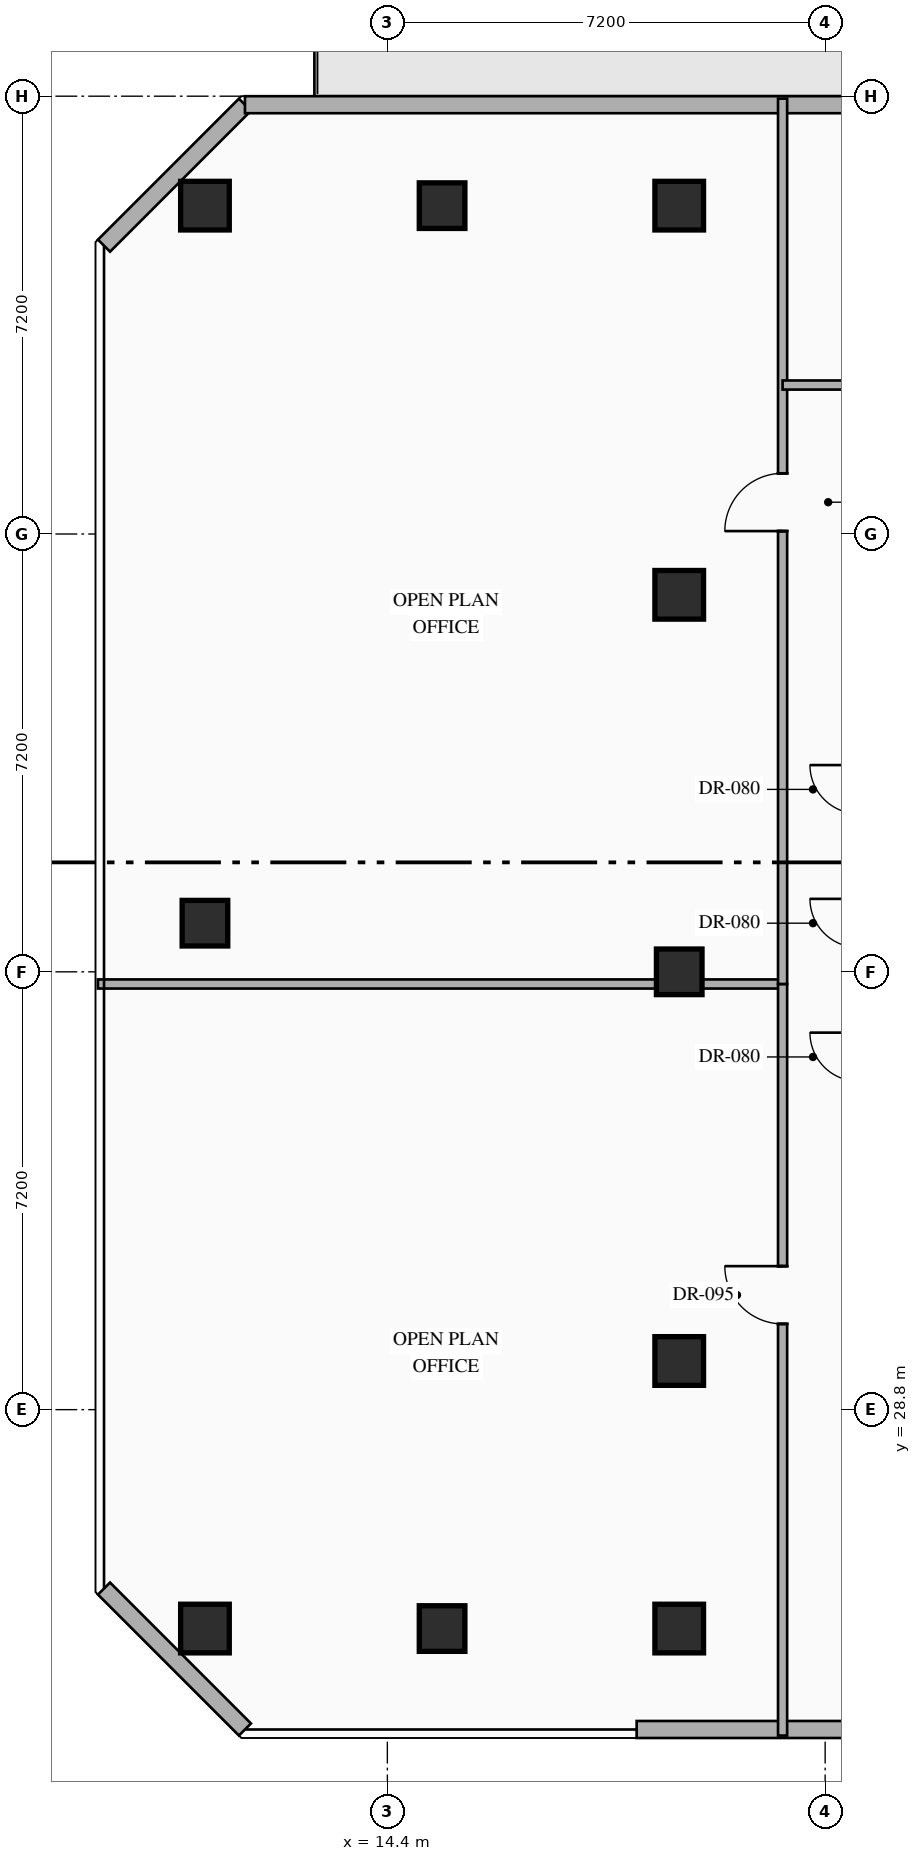
"""IFC4 building model, lengths in metres.
Left out: names, types, materials, properties, quantities, classifications, styles, units other than length and angle.
Written with IfcOpenShell. Run it as: python <this file> out.ifc"""

import sys

from ifc_helpers import new_model, si_unit, direction, frame, frame_2d, origin, origin_2d, place, context, subcontext, project, spatial, rectangle, hollow_rectangle, extrude, element, fill, save


model = new_model("IFC4")
c1 = context("Model", 3, precision=1e-05, world=origin(), true_north=direction((0.0, 1.0)))
c2 = subcontext(c1, "Body", "Model", "MODEL_VIEW")
j1 = project(units=[si_unit("LENGTHUNIT", "METRE"), si_unit("PLANEANGLEUNIT", "RADIAN")], contexts=[c1])
p1 = place(None, origin())
s1 = spatial("IfcSite", under=j1, at=p1, CompositionType="ELEMENT")
p2 = place(p1, origin())
s2 = spatial("IfcBuilding", under=s1, at=p2, CompositionType="ELEMENT")
p3 = place(p2, frame((0.0, 0.0, 174.45)))
s3 = spatial("IfcBuildingStorey", under=s2, at=p3, CompositionType="ELEMENT", Elevation=174.45)
for number, where, z_axis, x_axis in (
    (1, (11.4, 25.2, 0.0), (0.0, 0.0, 1.0), (1.0, 0.0, 0.0)),
    (2, (11.4, 48.6, 0.0), (0.0, 0.0, 1.0), (1.0, 0.0, 0.0)),
    (3, (19.2, 48.6, 0.0), (0.0, 0.0, 1.0), (1.0, 0.0, 0.0)),
    (4, (19.2, 25.2, 0.0), (0.0, 0.0, 1.0), (1.0, 0.0, 0.0)),
    (5, (19.2, 29.6, 0.0), (0.0, 0.0, 1.0), (1.0, 0.0, 0.0)),
    (6, (19.2, 42.2, 0.0), (0.0, 0.0, 1.0), (1.0, 0.0, 0.0)),
):
    element("IfcColumn", number, at=place(p3, frame(where, z_axis=z_axis, x_axis=x_axis)), inside=s3, PredefinedType="COLUMN", context=c2, shape_type="SweptSolid", body=[
        extrude(hollow_rectangle(XDim=0.8, YDim=0.8, WallThickness=0.032, at=origin_2d()), origin(), (0.0, 0.0, 1.0), 3.6),
    ])
for number, where, z_axis, x_axis in (
    (7, (11.4, 36.8, 0.0), (0.0, 0.0, 1.0), (1.0, 0.0, 0.0)),
    (8, (19.2, 36.0, 0.0), (0.0, 0.0, 1.0), (1.0, 0.0, 0.0)),
    (9, (15.3, 25.2, 0.0), (0.0, 0.0, 1.0), (1.0, 0.0, 0.0)),
    (10, (15.3, 48.6, 0.0), (0.0, 0.0, 1.0), (1.0, 0.0, 0.0)),
):
    element("IfcColumn", number, at=place(p3, frame(where, z_axis=z_axis, x_axis=x_axis)), inside=s3, PredefinedType="COLUMN", context=c2, shape_type="SweptSolid", body=[
        extrude(hollow_rectangle(XDim=0.75, YDim=0.75, WallThickness=0.028, at=origin_2d()), origin(), (0.0, 0.0, 1.0), 3.6),
    ])
p4 = place(p3, frame((25.247, 23.54, 0.0), z_axis=(0.0, 0.0, 1.0), x_axis=(-1.0, 0.0, 0.0)))
e11 = element("IfcWall", 11, at=p4, inside=s3, PredefinedType="STANDARD", context=c2, shape_type="SweptSolid", body=[
    extrude(rectangle(XDim=6.747, YDim=0.28, at=frame_2d((3.374, 0.0))), origin(), (0.0, 0.0, 1.0), 3.35),
])
p5 = place(p3, frame((12.058, 23.54, 0.0), z_axis=(0.0, 0.0, 1.0), x_axis=(-0.707144017911, 0.707069542501, 0.0)))
e12 = element("IfcWall", 12, at=p5, inside=s3, PredefinedType="STANDARD", context=c2, shape_type="SweptSolid", body=[
    extrude(rectangle(XDim=3.278, YDim=0.28, at=frame_2d((1.639, 0.0))), origin(), (0.0, 0.0, 1.0), 3.35),
])
p6 = place(p3, frame((9.74, 47.942, 0.0), z_axis=(0.0, 0.0, 1.0), x_axis=(0.707106781187, 0.707106781187, 0.0)))
e13 = element("IfcWall", 13, at=p6, inside=s3, PredefinedType="STANDARD", context=c2, shape_type="SweptSolid", body=[
    extrude(rectangle(XDim=3.278, YDim=0.28, at=frame_2d((1.639, 0.0))), origin(), (0.0, 0.0, 1.0), 3.35),
])
p7 = place(p3, frame((12.058, 50.26, 0.0), z_axis=(0.0, 0.0, 1.0), x_axis=(1.0, 0.0, 0.0)))
e14 = element("IfcWall", 14, at=p7, inside=s3, PredefinedType="STANDARD", context=c2, shape_type="SweptSolid", body=[
    extrude(rectangle(XDim=30.484, YDim=0.28, at=frame_2d((15.242, 0.0))), origin(), (0.0, 0.0, 1.0), 3.35),
])
p8 = place(p7, frame((14.992, 0.0, 0.0)))
e15 = element("IfcOpeningElement", 15, at=p8, cuts=e14, PredefinedType="OPENING", context=c2, shape_type="SweptSolid", body=[
    extrude(rectangle(XDim=1.1, YDim=2.2, at=frame_2d((0.55, 1.1))), frame((0.0, 0.15, 0.0), z_axis=(0.0, -1.0, 0.0), x_axis=(1.0, 0.0, 0.0)), (0.0, 0.0, 1.0), 0.3),
])
p9 = place(p7, frame((10.074, 0.0, 0.85)))
e16 = element("IfcOpeningElement", 16, at=p9, cuts=e14, PredefinedType="OPENING", context=c2, shape_type="SweptSolid", body=[
    extrude(rectangle(XDim=1.8, YDim=2.1, at=frame_2d((0.9, 1.05))), frame((0.0, 0.15, 0.0), z_axis=(0.0, -1.0, 0.0), x_axis=(1.0, 0.0, 0.0)), (0.0, 0.0, 1.0), 0.3),
])
p10 = place(p3, frame((9.64, 35.8, 0.0), z_axis=(0.0, 0.0, 1.0), x_axis=(1.0, 0.0, 0.0)))
e17 = element("IfcWall", 17, at=p10, inside=s3, PredefinedType="PARTITIONING", context=c2, shape_type="SweptSolid", body=[
    extrude(rectangle(XDim=11.26, YDim=0.15, at=frame_2d((5.63, 0.0))), origin(), (0.0, 0.0, 1.0), 2.695),
])
p11 = place(p3, frame((20.9, 23.44, 0.0), z_axis=(0.0, 0.0, 1.0), x_axis=(0.0, 1.0, 0.0)))
e18 = element("IfcWall", 18, at=p11, inside=s3, PredefinedType="PARTITIONING", context=c2, shape_type="SweptSolid", body=[
    extrude(rectangle(XDim=12.36, YDim=0.15, at=frame_2d((6.18, 0.0))), origin(), (0.0, 0.0, 1.0), 3.35),
])
p12 = place(p11, frame((6.77, 0.0, 0.0)))
e19 = element("IfcOpeningElement", 19, at=p12, cuts=e18, PredefinedType="OPENING", context=c2, shape_type="SweptSolid", body=[
    extrude(rectangle(XDim=0.95, YDim=2.15, at=frame_2d((0.475, 1.075))), frame((0.0, 0.085, 0.0), z_axis=(0.0, -1.0, 0.0), x_axis=(1.0, 0.0, 0.0)), (0.0, 0.0, 1.0), 0.17),
])
p13 = place(p3, frame((20.9, 35.8, 0.0), z_axis=(0.0, 0.0, 1.0), x_axis=(0.0, 1.0, 0.0)))
e20 = element("IfcWall", 20, at=p13, inside=s3, PredefinedType="PARTITIONING", context=c2, shape_type="SweptSolid", body=[
    extrude(rectangle(XDim=14.56, YDim=0.15, at=frame_2d((7.28, 0.0))), origin(), (0.0, 0.0, 1.0), 3.35),
])
p14 = place(p13, frame((7.448, 0.0, 0.0)))
e21 = element("IfcOpeningElement", 21, at=p14, cuts=e20, PredefinedType="OPENING", context=c2, shape_type="SweptSolid", body=[
    extrude(rectangle(XDim=0.95, YDim=2.15, at=frame_2d((0.475, 1.075))), frame((0.0, 0.085, 0.0), z_axis=(0.0, -1.0, 0.0), x_axis=(1.0, 0.0, 0.0)), (0.0, 0.0, 1.0), 0.17),
])
p15 = place(p3, frame((20.9, 45.65, 0.0), z_axis=(0.0, 0.0, 1.0), x_axis=(1.0, 0.0, 0.0)))
e22 = element("IfcWall", 22, at=p15, inside=s3, PredefinedType="PARTITIONING", context=c2, shape_type="SweptSolid", body=[
    extrude(rectangle(XDim=11.9, YDim=0.15, at=frame_2d((5.95, 0.0))), origin(), (0.0, 0.0, 1.0), 2.695),
])
p16 = place(p15, frame((6.494, 0.0, 0.0)))
e23 = element("IfcOpeningElement", 23, at=p16, cuts=e22, PredefinedType="OPENING", context=c2, shape_type="SweptSolid", body=[
    extrude(rectangle(XDim=0.95, YDim=2.15, at=frame_2d((0.475, 1.075))), frame((0.0, 0.085, 0.0), z_axis=(0.0, -1.0, 0.0), x_axis=(1.0, 0.0, 0.0)), (0.0, 0.0, 1.0), 0.17),
])
p17 = place(p12, origin())
e24 = element("IfcDoor", 24, at=p17, inside=s3, OperationType="SINGLE_SWING_RIGHT", PredefinedType="DOOR", context=c2, shape_type="SweptSolid", body=[
    extrude(rectangle(XDim=0.95, YDim=2.15, at=frame_2d((0.475, 1.075))), frame((0.0, 0.025, 0.0), z_axis=(0.0, -1.0, 0.0), x_axis=(1.0, 0.0, 0.0)), (0.0, 0.0, 1.0), 0.05),
])
fill(e19, e24)
p18 = place(p14, origin())
e25 = element("IfcDoor", 25, at=p18, inside=s3, OperationType="SINGLE_SWING_LEFT", PredefinedType="DOOR", context=c2, shape_type="SweptSolid", body=[
    extrude(rectangle(XDim=0.95, YDim=2.15, at=frame_2d((0.475, 1.075))), frame((0.0, 0.025, 0.0), z_axis=(0.0, -1.0, 0.0), x_axis=(1.0, 0.0, 0.0)), (0.0, 0.0, 1.0), 0.05),
])
fill(e21, e25)
save(model, sys.argv[1])
